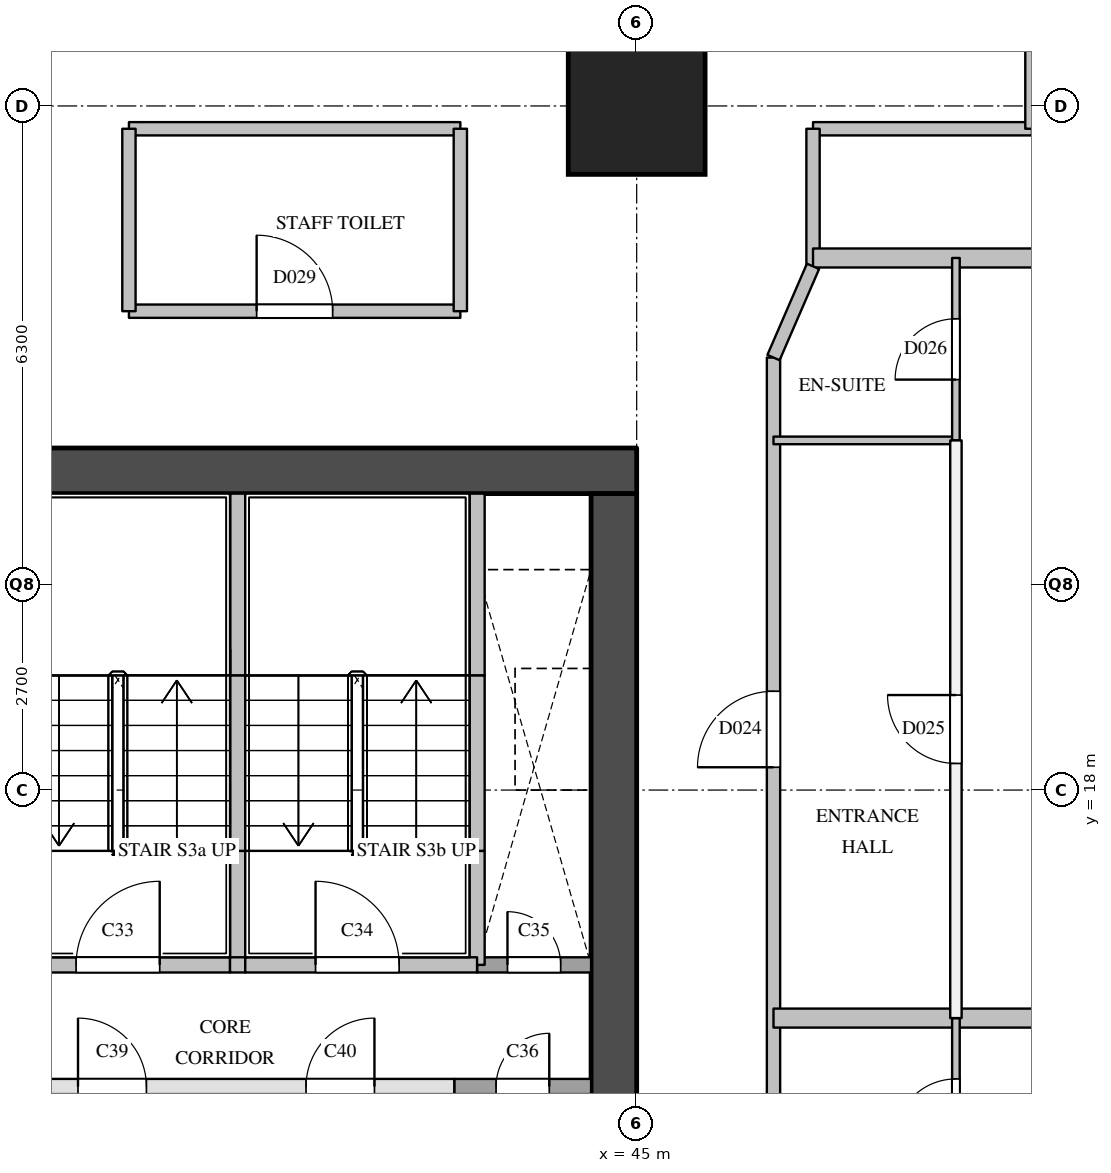
"""IFC4 building model, lengths in metres.
Left out: names, types, materials, properties, quantities, classifications, styles, units other than length and angle.
Written with IfcOpenShell. Run it as: python <this file> out.ifc"""

import sys

from ifc_helpers import new_model, si_unit, direction, frame, frame_2d, origin, origin_2d, place, context, subcontext, project, spatial, rectangle, extrude, element, fill, save


model = new_model("IFC4")
c1 = context("Model", 3, precision=1e-05, world=origin(), true_north=direction((0.0, 1.0)))
c2 = subcontext(c1, "Body", "Model", "MODEL_VIEW")
j1 = project(units=[si_unit("LENGTHUNIT", "METRE"), si_unit("PLANEANGLEUNIT", "RADIAN")], contexts=[c1])
p1 = place(None, origin())
s1 = spatial("IfcSite", under=j1, at=p1, CompositionType="ELEMENT")
p2 = place(p1, origin())
s2 = spatial("IfcBuilding", under=s1, at=p2, CompositionType="ELEMENT")
p3 = place(p2, frame((0.0, 0.0, 72.8)))
s3 = spatial("IfcBuildingStorey", under=s2, at=p3, CompositionType="ELEMENT", Elevation=72.8)
p4 = place(p3, frame((45.0, 27.0, 0.0), z_axis=(0.0, 0.0, 1.0), x_axis=(1.0, 0.0, 0.0)))
e1 = element("IfcColumn", 1, at=p4, inside=s3, PredefinedType="COLUMN", context=c2, shape_type="SweptSolid", body=[
    extrude(rectangle(XDim=1.8, YDim=1.8, at=origin_2d()), origin(), (0.0, 0.0, 1.0), 5.0),
])
p5 = place(p3, frame((36.0, 22.2, 0.0), z_axis=(0.0, 0.0, 1.0), x_axis=(1.0, 0.0, 0.0)))
e2 = element("IfcWall", 2, at=p5, inside=s3, PredefinedType="SHEAR", context=c2, shape_type="SweptSolid", body=[
    extrude(rectangle(XDim=9.0, YDim=0.6, at=frame_2d((4.5, 0.0))), origin(), (0.0, 0.0, 1.0), 4.7),
])
p6 = place(p3, frame((44.7, 9.6, 0.0), z_axis=(0.0, 0.0, 1.0), x_axis=(0.0, 1.0, 0.0)))
e3 = element("IfcWall", 3, at=p6, inside=s3, PredefinedType="SHEAR", context=c2, shape_type="SweptSolid", body=[
    extrude(rectangle(XDim=12.3, YDim=0.6, at=frame_2d((6.15, 0.0))), origin(), (0.0, 0.0, 1.0), 4.7),
])
p7 = place(p6, frame((0.8, 0.0, 0.0)))
e4 = element("IfcOpeningElement", 4, at=p7, cuts=e3, PredefinedType="OPENING", context=c2, shape_type="SweptSolid", body=[
    extrude(rectangle(XDim=0.7, YDim=2.1, at=frame_2d((0.35, 1.05))), frame((0.0, 0.31, 0.0), z_axis=(0.0, -1.0, 0.0), x_axis=(1.0, 0.0, 0.0)), (0.0, 0.0, 1.0), 0.62),
])
p8 = place(p3, frame((39.6, 11.9, 0.0), z_axis=(0.0, 0.0, 1.0), x_axis=(0.0, 1.0, 0.0)))
e5 = element("IfcWall", 5, at=p8, inside=s3, PredefinedType="PARTITIONING", context=c2, shape_type="SweptSolid", body=[
    extrude(rectangle(XDim=2.2, YDim=0.2, at=frame_2d((1.1, 0.0))), origin(), (0.0, 0.0, 1.0), 4.7),
])
p9 = place(p3, frame((39.75, 15.7, 0.0), z_axis=(0.0, 0.0, 1.0), x_axis=(0.0, 1.0, 0.0)))
e6 = element("IfcWall", 6, at=p9, inside=s3, PredefinedType="SOLIDWALL", context=c2, shape_type="SweptSolid", body=[
    extrude(rectangle(XDim=1.5, YDim=0.2, at=frame_2d((0.75, 0.0))), origin(), (0.0, 0.0, 1.0), 4.7),
])
p10 = place(p3, frame((39.75, 17.2, 0.0), z_axis=(0.0, 0.0, 1.0), x_axis=(0.0, 1.0, 0.0)))
e7 = element("IfcWall", 7, at=p10, inside=s3, PredefinedType="SOLIDWALL", context=c2, shape_type="SweptSolid", body=[
    extrude(rectangle(XDim=2.31, YDim=0.2, at=frame_2d((1.155, 0.0))), origin(), (0.0, 0.0, 1.0), 4.7),
])
p11 = place(p3, frame((39.75, 19.51, 0.0), z_axis=(0.0, 0.0, 1.0), x_axis=(0.0, 1.0, 0.0)))
e8 = element("IfcWall", 8, at=p11, inside=s3, PredefinedType="SOLIDWALL", context=c2, shape_type="SweptSolid", body=[
    extrude(rectangle(XDim=2.39, YDim=0.2, at=frame_2d((1.195, 0.0))), origin(), (0.0, 0.0, 1.0), 4.7),
])
p12 = place(p3, frame((42.6, 11.9, 0.0), z_axis=(0.0, 0.0, 1.0), x_axis=(0.0, 1.0, 0.0)))
e9 = element("IfcWall", 9, at=p12, inside=s3, PredefinedType="SOLIDWALL", context=c2, shape_type="SweptSolid", body=[
    extrude(rectangle(XDim=2.2, YDim=0.2, at=frame_2d((1.1, 0.0))), origin(), (0.0, 0.0, 1.0), 4.7),
])
p13 = place(p3, frame((42.9, 15.7, 0.0), z_axis=(0.0, 0.0, 1.0), x_axis=(0.0, 1.0, 0.0)))
e10 = element("IfcWall", 10, at=p13, inside=s3, PredefinedType="SOLIDWALL", context=c2, shape_type="SweptSolid", body=[
    extrude(rectangle(XDim=1.5, YDim=0.2, at=frame_2d((0.75, 0.0))), origin(), (0.0, 0.0, 1.0), 4.7),
])
p14 = place(p3, frame((42.9, 17.2, 0.0), z_axis=(0.0, 0.0, 1.0), x_axis=(0.0, 1.0, 0.0)))
e11 = element("IfcWall", 11, at=p14, inside=s3, PredefinedType="SOLIDWALL", context=c2, shape_type="SweptSolid", body=[
    extrude(rectangle(XDim=2.31, YDim=0.2, at=frame_2d((1.155, 0.0))), origin(), (0.0, 0.0, 1.0), 4.7),
])
p15 = place(p3, frame((42.9, 19.51, 0.0), z_axis=(0.0, 0.0, 1.0), x_axis=(0.0, 1.0, 0.0)))
e12 = element("IfcWall", 12, at=p15, inside=s3, PredefinedType="SOLIDWALL", context=c2, shape_type="SweptSolid", body=[
    extrude(rectangle(XDim=2.39, YDim=0.2, at=frame_2d((1.195, 0.0))), origin(), (0.0, 0.0, 1.0), 4.7),
])
p16 = place(p3, frame((36.6, 14.1, 0.0), z_axis=(0.0, 0.0, 1.0), x_axis=(1.0, 0.0, 0.0)))
e13 = element("IfcWall", 13, at=p16, inside=s3, PredefinedType="PARTITIONING", context=c2, shape_type="SweptSolid", body=[
    extrude(rectangle(XDim=6.0, YDim=0.2, at=frame_2d((3.0, 0.0))), origin(), (0.0, 0.0, 1.0), 4.7),
])
p17 = place(p16, frame((1.05, 0.0, 0.0)))
e14 = element("IfcOpeningElement", 14, at=p17, cuts=e13, PredefinedType="OPENING", context=c2, shape_type="SweptSolid", body=[
    extrude(rectangle(XDim=0.9, YDim=2.1, at=frame_2d((0.45, 1.05))), frame((0.0, 0.11, 0.0), z_axis=(0.0, -1.0, 0.0), x_axis=(1.0, 0.0, 0.0)), (0.0, 0.0, 1.0), 0.22),
])
p18 = place(p16, frame((4.05, 0.0, 0.0)))
e15 = element("IfcOpeningElement", 15, at=p18, cuts=e13, PredefinedType="OPENING", context=c2, shape_type="SweptSolid", body=[
    extrude(rectangle(XDim=0.9, YDim=2.1, at=frame_2d((0.45, 1.05))), frame((0.0, 0.11, 0.0), z_axis=(0.0, -1.0, 0.0), x_axis=(1.0, 0.0, 0.0)), (0.0, 0.0, 1.0), 0.22),
])
p19 = place(p3, frame((42.6, 14.1, 0.0), z_axis=(0.0, 0.0, 1.0), x_axis=(1.0, 0.0, 0.0)))
e16 = element("IfcWall", 16, at=p19, inside=s3, PredefinedType="SOLIDWALL", context=c2, shape_type="SweptSolid", body=[
    extrude(rectangle(XDim=1.8, YDim=0.2, at=frame_2d((0.9, 0.0))), origin(), (0.0, 0.0, 1.0), 4.7),
])
p20 = place(p19, frame((0.55, 0.0, 0.0)))
e17 = element("IfcOpeningElement", 17, at=p20, cuts=e16, PredefinedType="OPENING", context=c2, shape_type="SweptSolid", body=[
    extrude(rectangle(XDim=0.7, YDim=2.1, at=frame_2d((0.35, 1.05))), frame((0.0, 0.11, 0.0), z_axis=(0.0, -1.0, 0.0), x_axis=(1.0, 0.0, 0.0)), (0.0, 0.0, 1.0), 0.22),
])
p21 = place(p3, frame((42.9, 15.7, 0.0), z_axis=(0.0, 0.0, 1.0), x_axis=(1.0, 0.0, 0.0)))
e18 = element("IfcWall", 18, at=p21, inside=s3, PredefinedType="SOLIDWALL", context=c2, shape_type="SweptSolid", body=[
    extrude(rectangle(XDim=1.5, YDim=0.2, at=frame_2d((0.75, 0.0))), origin(), (0.0, 0.0, 1.0), 4.7),
])
p22 = place(p21, frame((0.4, 0.0, 0.0)))
e19 = element("IfcOpeningElement", 19, at=p22, cuts=e18, PredefinedType="OPENING", context=c2, shape_type="SweptSolid", body=[
    extrude(rectangle(XDim=0.7, YDim=2.1, at=frame_2d((0.35, 1.05))), frame((0.0, 0.11, 0.0), z_axis=(0.0, -1.0, 0.0), x_axis=(1.0, 0.0, 0.0)), (0.0, 0.0, 1.0), 0.22),
])
p23 = place(p3, frame((36.6, 15.7, 0.0), z_axis=(0.0, 0.0, 1.0), x_axis=(1.0, 0.0, 0.0)))
e20 = element("IfcWall", 20, at=p23, inside=s3, PredefinedType="SOLIDWALL", context=c2, shape_type="SweptSolid", body=[
    extrude(rectangle(XDim=3.05, YDim=0.2, at=frame_2d((1.525, 0.0))), origin(), (0.0, 0.0, 1.0), 4.7),
])
p24 = place(p23, frame((1.025, 0.0, 0.0)))
e21 = element("IfcOpeningElement", 21, at=p24, cuts=e20, PredefinedType="OPENING", context=c2, shape_type="SweptSolid", body=[
    extrude(rectangle(XDim=1.1, YDim=2.1, at=frame_2d((0.55, 1.05))), frame((0.0, 0.11, 0.0), z_axis=(0.0, -1.0, 0.0), x_axis=(1.0, 0.0, 0.0)), (0.0, 0.0, 1.0), 0.22),
])
p25 = place(p3, frame((39.65, 15.7, 0.0), z_axis=(0.0, 0.0, 1.0), x_axis=(1.0, 0.0, 0.0)))
e22 = element("IfcWall", 22, at=p25, inside=s3, PredefinedType="SOLIDWALL", context=c2, shape_type="SweptSolid", body=[
    extrude(rectangle(XDim=0.2, YDim=0.2, at=frame_2d((0.1, 0.0))), origin(), (0.0, 0.0, 1.0), 4.7),
])
p26 = place(p3, frame((39.85, 15.7, 0.0), z_axis=(0.0, 0.0, 1.0), x_axis=(1.0, 0.0, 0.0)))
e23 = element("IfcWall", 23, at=p26, inside=s3, PredefinedType="SOLIDWALL", context=c2, shape_type="SweptSolid", body=[
    extrude(rectangle(XDim=3.05, YDim=0.2, at=frame_2d((1.525, 0.0))), origin(), (0.0, 0.0, 1.0), 4.7),
])
p27 = place(p26, frame((0.925, 0.0, 0.0)))
e24 = element("IfcOpeningElement", 24, at=p27, cuts=e23, PredefinedType="OPENING", context=c2, shape_type="SweptSolid", body=[
    extrude(rectangle(XDim=1.1, YDim=2.1, at=frame_2d((0.55, 1.05))), frame((0.0, 0.11, 0.0), z_axis=(0.0, -1.0, 0.0), x_axis=(1.0, 0.0, 0.0)), (0.0, 0.0, 1.0), 0.22),
])
p28 = place(p3, frame((38.32, 24.3, 0.0), z_axis=(0.0, 0.0, 1.0), x_axis=(1.0, 0.0, 0.0)))
e25 = element("IfcWall", 25, at=p28, inside=s3, PredefinedType="PARTITIONING", context=c2, shape_type="SweptSolid", body=[
    extrude(rectangle(XDim=4.36, YDim=0.175, at=frame_2d((2.18, 0.0))), origin(), (0.0, 0.0, 1.0), 4.7),
])
p29 = place(p28, frame((1.68, 0.0, 0.0)))
e26 = element("IfcOpeningElement", 26, at=p29, cuts=e25, PredefinedType="OPENING", context=c2, shape_type="SweptSolid", body=[
    extrude(rectangle(XDim=1.0, YDim=2.1, at=frame_2d((0.5, 1.05))), frame((0.0, 0.097, 0.0), z_axis=(0.0, -1.0, 0.0), x_axis=(1.0, 0.0, 0.0)), (0.0, 0.0, 1.0), 0.195),
])
p30 = place(p3, frame((38.32, 26.7, 0.0), z_axis=(0.0, 0.0, 1.0), x_axis=(1.0, 0.0, 0.0)))
e27 = element("IfcWall", 27, at=p30, inside=s3, PredefinedType="PARTITIONING", context=c2, shape_type="SweptSolid", body=[
    extrude(rectangle(XDim=4.36, YDim=0.175, at=frame_2d((2.18, 0.0))), origin(), (0.0, 0.0, 1.0), 3.7),
])
p31 = place(p3, frame((47.32, 26.7, 0.0), z_axis=(0.0, 0.0, 1.0), x_axis=(1.0, 0.0, 0.0)))
e28 = element("IfcWall", 28, at=p31, inside=s3, PredefinedType="PARTITIONING", context=c2, shape_type="SweptSolid", body=[
    extrude(rectangle(XDim=2.88, YDim=0.175, at=frame_2d((1.44, 0.0))), origin(), (0.0, 0.0, 1.0), 3.7),
])
for number, where, z_axis, x_axis in (
    (29, (38.32, 24.3, 0.0), (0.0, 0.0, 1.0), (0.0, 1.0, 0.0)),
    (30, (42.68, 24.3, 0.0), (0.0, 0.0, 1.0), (0.0, 1.0, 0.0)),
):
    element("IfcWall", number, at=place(p3, frame(where, z_axis=z_axis, x_axis=x_axis)), inside=s3, PredefinedType="PARTITIONING", context=c2, shape_type="SweptSolid", body=[
        extrude(rectangle(XDim=2.4, YDim=0.175, at=frame_2d((1.2, 0.0))), origin(), (0.0, 0.0, 1.0), 3.7),
    ])
p32 = place(p3, frame((46.8, 7.2, 0.0), z_axis=(0.0, 0.0, 1.0), x_axis=(0.0, 1.0, 0.0)))
e31 = element("IfcWall", 31, at=p32, inside=s3, PredefinedType="PARTITIONING", context=c2, shape_type="SweptSolid", body=[
    extrude(rectangle(XDim=16.49, YDim=0.175, at=frame_2d((8.245, 0.0))), origin(), (0.0, 0.0, 1.0), 4.7),
])
p33 = place(p32, frame((0.95, 0.0, 0.0)))
e32 = element("IfcOpeningElement", 32, at=p33, cuts=e31, PredefinedType="OPENING", context=c2, shape_type="SweptSolid", body=[
    extrude(rectangle(XDim=0.9, YDim=2.1, at=frame_2d((0.45, 1.05))), frame((0.0, 0.097, 0.0), z_axis=(0.0, -1.0, 0.0), x_axis=(1.0, 0.0, 0.0)), (0.0, 0.0, 1.0), 0.195),
])
p34 = place(p32, frame((3.6, 0.0, 0.0)))
e33 = element("IfcOpeningElement", 33, at=p34, cuts=e31, PredefinedType="OPENING", context=c2, shape_type="SweptSolid", body=[
    extrude(rectangle(XDim=1.0, YDim=2.1, at=frame_2d((0.5, 1.05))), frame((0.0, 0.097, 0.0), z_axis=(0.0, -1.0, 0.0), x_axis=(1.0, 0.0, 0.0)), (0.0, 0.0, 1.0), 0.195),
])
p35 = place(p32, frame((11.1, 0.0, 0.0)))
e34 = element("IfcOpeningElement", 34, at=p35, cuts=e31, PredefinedType="OPENING", context=c2, shape_type="SweptSolid", body=[
    extrude(rectangle(XDim=1.0, YDim=2.1, at=frame_2d((0.5, 1.05))), frame((0.0, 0.097, 0.0), z_axis=(0.0, -1.0, 0.0), x_axis=(1.0, 0.0, 0.0)), (0.0, 0.0, 1.0), 0.195),
])
p36 = place(p3, frame((47.32, 24.89, 0.0), z_axis=(0.0, 0.0, 1.0), x_axis=(0.0, 1.0, 0.0)))
e35 = element("IfcWall", 35, at=p36, inside=s3, PredefinedType="PARTITIONING", context=c2, shape_type="SweptSolid", body=[
    extrude(rectangle(XDim=1.81, YDim=0.175, at=frame_2d((0.905, 0.0))), origin(), (0.0, 0.0, 1.0), 3.7),
])
p37 = place(p3, frame((50.2, 26.7, 0.0), z_axis=(0.0, 0.0, 1.0), x_axis=(0.0, 1.0, 0.0)))
e36 = element("IfcWall", 36, at=p37, inside=s3, PredefinedType="PARTITIONING", context=c2, shape_type="SweptSolid", body=[
    extrude(rectangle(XDim=25.1, YDim=0.175, at=frame_2d((12.55, 0.0))), origin(), (0.0, 0.0, 1.0), 3.7),
])
p38 = place(p37, frame((1.2, 0.0, 0.0)))
e37 = element("IfcOpeningElement", 37, at=p38, cuts=e36, PredefinedType="OPENING", context=c2, shape_type="SweptSolid", body=[
    extrude(rectangle(XDim=0.9, YDim=2.1, at=frame_2d((0.45, 1.05))), frame((0.0, 0.097, 0.0), z_axis=(0.0, -1.0, 0.0), x_axis=(1.0, 0.0, 0.0)), (0.0, 0.0, 1.0), 0.195),
])
p39 = place(p37, frame((7.85, 0.0, 0.0)))
e38 = element("IfcOpeningElement", 38, at=p39, cuts=e36, PredefinedType="OPENING", context=c2, shape_type="SweptSolid", body=[
    extrude(rectangle(XDim=0.9, YDim=2.1, at=frame_2d((0.45, 1.05))), frame((0.0, 0.097, 0.0), z_axis=(0.0, -1.0, 0.0), x_axis=(1.0, 0.0, 0.0)), (0.0, 0.0, 1.0), 0.195),
])
p40 = place(p37, frame((15.35, 0.0, 0.0)))
e39 = element("IfcOpeningElement", 39, at=p40, cuts=e36, PredefinedType="OPENING", context=c2, shape_type="SweptSolid", body=[
    extrude(rectangle(XDim=0.9, YDim=2.1, at=frame_2d((0.45, 1.05))), frame((0.0, 0.097, 0.0), z_axis=(0.0, -1.0, 0.0), x_axis=(1.0, 0.0, 0.0)), (0.0, 0.0, 1.0), 0.195),
])
p41 = place(p37, frame((21.25, 0.0, 0.0)))
e40 = element("IfcOpeningElement", 40, at=p41, cuts=e36, PredefinedType="OPENING", context=c2, shape_type="SweptSolid", body=[
    extrude(rectangle(XDim=0.9, YDim=2.1, at=frame_2d((0.45, 1.05))), frame((0.0, 0.097, 0.0), z_axis=(0.0, -1.0, 0.0), x_axis=(1.0, 0.0, 0.0)), (0.0, 0.0, 1.0), 0.195),
])
p42 = place(p3, frame((49.2, 15.0, 0.0), z_axis=(0.0, 0.0, 1.0), x_axis=(0.0, 1.0, 0.0)))
e41 = element("IfcWall", 41, at=p42, inside=s3, PredefinedType="PARTITIONING", context=c2, shape_type="SweptSolid", body=[
    extrude(rectangle(XDim=7.6, YDim=0.15, at=frame_2d((3.8, 0.0))), origin(), (0.0, 0.0, 1.0), 4.7),
])
p43 = place(p42, frame((3.35, 0.0, 0.0)))
e42 = element("IfcOpeningElement", 42, at=p43, cuts=e41, PredefinedType="OPENING", context=c2, shape_type="SweptSolid", body=[
    extrude(rectangle(XDim=0.9, YDim=2.1, at=frame_2d((0.45, 1.05))), frame((0.0, 0.085, 0.0), z_axis=(0.0, -1.0, 0.0), x_axis=(1.0, 0.0, 0.0)), (0.0, 0.0, 1.0), 0.17),
])
p44 = place(p3, frame((46.8, 15.0, 0.0), z_axis=(0.0, 0.0, 1.0), x_axis=(1.0, 0.0, 0.0)))
e43 = element("IfcWall", 43, at=p44, inside=s3, PredefinedType="PARTITIONING", context=c2, shape_type="SweptSolid", body=[
    extrude(rectangle(XDim=7.2, YDim=0.25, at=frame_2d((3.6, 0.0))), origin(), (0.0, 0.0, 1.0), 3.7),
])
p45 = place(p3, frame((47.32, 25.0, 0.0), z_axis=(0.0, 0.0, 1.0), x_axis=(1.0, 0.0, 0.0)))
e44 = element("IfcWall", 44, at=p45, inside=s3, PredefinedType="PARTITIONING", context=c2, shape_type="SweptSolid", body=[
    extrude(rectangle(XDim=6.68, YDim=0.25, at=frame_2d((3.34, 0.0))), origin(), (0.0, 0.0, 1.0), 3.7),
])
p46 = place(p3, frame((46.8, 22.6, 0.0), z_axis=(0.0, 0.0, 1.0), x_axis=(1.0, 0.0, 0.0)))
e45 = element("IfcWall", 45, at=p46, inside=s3, PredefinedType="PARTITIONING", context=c2, shape_type="SweptSolid", body=[
    extrude(rectangle(XDim=2.4, YDim=0.1, at=frame_2d((1.2, 0.0))), origin(), (0.0, 0.0, 1.0), 4.7),
])
p47 = place(p3, frame((49.2, 12.6, 0.0), z_axis=(0.0, 0.0, 1.0), x_axis=(0.0, 1.0, 0.0)))
e46 = element("IfcWall", 46, at=p47, inside=s3, PredefinedType="PARTITIONING", context=c2, shape_type="SweptSolid", body=[
    extrude(rectangle(XDim=2.4, YDim=0.1, at=frame_2d((1.2, 0.0))), origin(), (0.0, 0.0, 1.0), 4.7),
])
p48 = place(p47, frame((0.8, 0.0, 0.0)))
e47 = element("IfcOpeningElement", 47, at=p48, cuts=e46, PredefinedType="OPENING", context=c2, shape_type="SweptSolid", body=[
    extrude(rectangle(XDim=0.8, YDim=2.1, at=frame_2d((0.4, 1.05))), frame((0.0, 0.06, 0.0), z_axis=(0.0, -1.0, 0.0), x_axis=(1.0, 0.0, 0.0)), (0.0, 0.0, 1.0), 0.12),
])
p49 = place(p3, frame((49.2, 22.6, 0.0), z_axis=(0.0, 0.0, 1.0), x_axis=(0.0, 1.0, 0.0)))
e48 = element("IfcWall", 48, at=p49, inside=s3, PredefinedType="PARTITIONING", context=c2, shape_type="SweptSolid", body=[
    extrude(rectangle(XDim=2.4, YDim=0.1, at=frame_2d((1.2, 0.0))), origin(), (0.0, 0.0, 1.0), 4.7),
])
p50 = place(p49, frame((0.8, 0.0, 0.0)))
e49 = element("IfcOpeningElement", 49, at=p50, cuts=e48, PredefinedType="OPENING", context=c2, shape_type="SweptSolid", body=[
    extrude(rectangle(XDim=0.8, YDim=2.1, at=frame_2d((0.4, 1.05))), frame((0.0, 0.06, 0.0), z_axis=(0.0, -1.0, 0.0), x_axis=(1.0, 0.0, 0.0)), (0.0, 0.0, 1.0), 0.12),
])
p51 = place(p3, frame((47.32, 24.89, 0.0), z_axis=(0.0, 0.0, 1.0), x_axis=(-0.397633632391, -0.917544273804, 0.0)))
e50 = element("IfcWall", 50, at=p51, inside=s3, PredefinedType="PARTITIONING", context=c2, shape_type="SweptSolid", body=[
    extrude(rectangle(XDim=1.308, YDim=0.175, at=frame_2d((0.654, 0.0))), origin(), (0.0, 0.0, 1.0), 4.7),
])
p52 = place(p24, origin())
e51 = element("IfcDoor", 51, at=p52, inside=s3, OperationType="SINGLE_SWING_RIGHT", PredefinedType="DOOR", context=c2, shape_type="SweptSolid", body=[
    extrude(rectangle(XDim=1.1, YDim=2.1, at=frame_2d((0.55, 1.05))), frame((0.0, 0.025, 0.0), z_axis=(0.0, -1.0, 0.0), x_axis=(1.0, 0.0, 0.0)), (0.0, 0.0, 1.0), 0.05),
])
fill(e21, e51)
p53 = place(p27, origin())
e52 = element("IfcDoor", 52, at=p53, inside=s3, OperationType="SINGLE_SWING_LEFT", PredefinedType="DOOR", context=c2, shape_type="SweptSolid", body=[
    extrude(rectangle(XDim=1.1, YDim=2.1, at=frame_2d((0.55, 1.05))), frame((0.0, 0.025, 0.0), z_axis=(0.0, -1.0, 0.0), x_axis=(1.0, 0.0, 0.0)), (0.0, 0.0, 1.0), 0.05),
])
fill(e24, e52)
p54 = place(p22, origin())
e53 = element("IfcDoor", 53, at=p54, inside=s3, OperationType="SINGLE_SWING_LEFT", PredefinedType="DOOR", context=c2, shape_type="SweptSolid", body=[
    extrude(rectangle(XDim=0.7, YDim=2.1, at=frame_2d((0.35, 1.05))), frame((0.0, 0.025, 0.0), z_axis=(0.0, -1.0, 0.0), x_axis=(1.0, 0.0, 0.0)), (0.0, 0.0, 1.0), 0.05),
])
fill(e19, e53)
p55 = place(p20, origin())
e54 = element("IfcDoor", 54, at=p55, inside=s3, OperationType="SINGLE_SWING_RIGHT", PredefinedType="DOOR", context=c2, shape_type="SweptSolid", body=[
    extrude(rectangle(XDim=0.7, YDim=2.1, at=frame_2d((0.35, 1.05))), frame((0.0, 0.025, 0.0), z_axis=(0.0, -1.0, 0.0), x_axis=(1.0, 0.0, 0.0)), (0.0, 0.0, 1.0), 0.05),
])
fill(e17, e54)
p56 = place(p17, origin())
e55 = element("IfcDoor", 55, at=p56, inside=s3, OperationType="SINGLE_SWING_LEFT", PredefinedType="DOOR", context=c2, shape_type="SweptSolid", body=[
    extrude(rectangle(XDim=0.9, YDim=2.1, at=frame_2d((0.45, 1.05))), frame((0.0, 0.025, 0.0), z_axis=(0.0, -1.0, 0.0), x_axis=(1.0, 0.0, 0.0)), (0.0, 0.0, 1.0), 0.05),
])
fill(e14, e55)
p57 = place(p18, origin())
e56 = element("IfcDoor", 56, at=p57, inside=s3, OperationType="SINGLE_SWING_RIGHT", PredefinedType="DOOR", context=c2, shape_type="SweptSolid", body=[
    extrude(rectangle(XDim=0.9, YDim=2.1, at=frame_2d((0.45, 1.05))), frame((0.0, 0.025, 0.0), z_axis=(0.0, -1.0, 0.0), x_axis=(1.0, 0.0, 0.0)), (0.0, 0.0, 1.0), 0.05),
])
fill(e15, e56)
p58 = place(p48, origin())
e57 = element("IfcDoor", 57, at=p58, inside=s3, OperationType="SINGLE_SWING_LEFT", PredefinedType="DOOR", context=c2, shape_type="SweptSolid", body=[
    extrude(rectangle(XDim=0.8, YDim=2.1, at=frame_2d((0.4, 1.05))), frame((0.0, 0.025, 0.0), z_axis=(0.0, -1.0, 0.0), x_axis=(1.0, 0.0, 0.0)), (0.0, 0.0, 1.0), 0.05),
])
fill(e47, e57)
p59 = place(p35, origin())
e58 = element("IfcDoor", 58, at=p59, inside=s3, OperationType="SINGLE_SWING_LEFT", PredefinedType="DOOR", context=c2, shape_type="SweptSolid", body=[
    extrude(rectangle(XDim=1.0, YDim=2.1, at=frame_2d((0.5, 1.05))), frame((0.0, 0.025, 0.0), z_axis=(0.0, -1.0, 0.0), x_axis=(1.0, 0.0, 0.0)), (0.0, 0.0, 1.0), 0.05),
])
fill(e34, e58)
p60 = place(p43, origin())
e59 = element("IfcDoor", 59, at=p60, inside=s3, OperationType="SINGLE_SWING_RIGHT", PredefinedType="DOOR", context=c2, shape_type="SweptSolid", body=[
    extrude(rectangle(XDim=0.9, YDim=2.1, at=frame_2d((0.45, 1.05))), frame((0.0, 0.025, 0.0), z_axis=(0.0, -1.0, 0.0), x_axis=(1.0, 0.0, 0.0)), (0.0, 0.0, 1.0), 0.05),
])
fill(e42, e59)
p61 = place(p50, origin())
e60 = element("IfcDoor", 60, at=p61, inside=s3, OperationType="SINGLE_SWING_LEFT", PredefinedType="DOOR", context=c2, shape_type="SweptSolid", body=[
    extrude(rectangle(XDim=0.8, YDim=2.1, at=frame_2d((0.4, 1.05))), frame((0.0, 0.025, 0.0), z_axis=(0.0, -1.0, 0.0), x_axis=(1.0, 0.0, 0.0)), (0.0, 0.0, 1.0), 0.05),
])
fill(e49, e60)
p62 = place(p29, origin())
e61 = element("IfcDoor", 61, at=p62, inside=s3, OperationType="SINGLE_SWING_LEFT", PredefinedType="DOOR", context=c2, shape_type="SweptSolid", body=[
    extrude(rectangle(XDim=1.0, YDim=2.1, at=frame_2d((0.5, 1.05))), frame((0.0, 0.025, 0.0), z_axis=(0.0, -1.0, 0.0), x_axis=(1.0, 0.0, 0.0)), (0.0, 0.0, 1.0), 0.05),
])
fill(e26, e61)
save(model, sys.argv[1])
